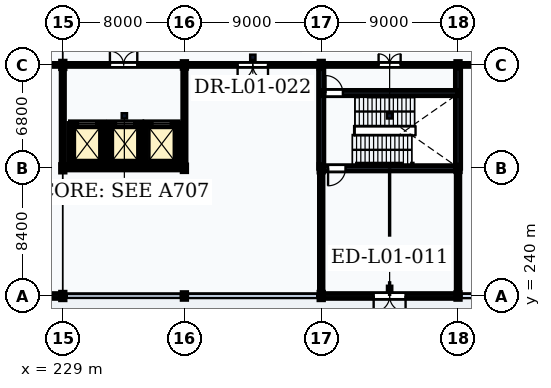
"""IFC4 building model, lengths in metres.
Left out: names, types, materials, properties, quantities, classifications, styles, units other than length and angle.
Written with IfcOpenShell. Run it as: python <this file> out.ifc"""

import sys

from ifc_helpers import new_model, si_unit, direction, frame, frame_2d, origin, origin_2d, place, context, subcontext, project, spatial, rectangle, i_section, extrude, element, fill, save


model = new_model("IFC4")
c1 = context("Model", 3, precision=1e-05, world=origin(), true_north=direction((0.0, 1.0)))
c2 = subcontext(c1, "Body", "Model", "MODEL_VIEW")
j1 = project(units=[si_unit("LENGTHUNIT", "METRE"), si_unit("PLANEANGLEUNIT", "RADIAN")], contexts=[c1])
p1 = place(None, origin())
s1 = spatial("IfcSite", under=j1, at=p1, CompositionType="ELEMENT")
p2 = place(p1, origin())
s2 = spatial("IfcBuilding", under=s1, at=p2, CompositionType="ELEMENT")
p3 = place(p2, origin())
s3 = spatial("IfcBuildingStorey", under=s2, at=p3, CompositionType="ELEMENT", Elevation=0.0)
for number, where, z_axis, x_axis in (
    (1, (229.0, 240.0, 0.0), (0.0, 0.0, 1.0), (1.0, 0.0, 0.0)),
    (2, (229.0, 248.4, 0.0), (0.0, 0.0, 1.0), (1.0, 0.0, 0.0)),
    (3, (229.0, 255.2, 0.0), (0.0, 0.0, 1.0), (1.0, 0.0, 0.0)),
):
    element("IfcColumn", number, at=place(p3, frame(where, z_axis=z_axis, x_axis=x_axis)), inside=s3, PredefinedType="COLUMN", context=c2, shape_type="SweptSolid", body=[
        extrude(i_section(OverallWidth=0.3, OverallDepth=0.5, WebThickness=0.014, FlangeThickness=0.028, FilletRadius=0.027, at=origin_2d()), origin(), (0.0, 0.0, 1.0), 5.4),
    ])
for number, where, z_axis, x_axis in (
    (4, (237.0, 240.0, 0.0), (0.0, 0.0, 1.0), (1.0, 0.0, 0.0)),
    (5, (237.0, 248.4, 0.0), (0.0, 0.0, 1.0), (1.0, 0.0, 0.0)),
    (6, (237.0, 255.2, 0.0), (0.0, 0.0, 1.0), (1.0, 0.0, 0.0)),
):
    element("IfcColumn", number, at=place(p3, frame(where, z_axis=z_axis, x_axis=x_axis)), inside=s3, PredefinedType="COLUMN", context=c2, shape_type="SweptSolid", body=[
        extrude(i_section(OverallWidth=0.3, OverallDepth=0.45, WebThickness=0.014, FlangeThickness=0.026, FilletRadius=0.027, at=origin_2d()), origin(), (0.0, 0.0, 1.0), 5.4),
    ])
for number, where, z_axis, x_axis in (
    (7, (246.0, 240.0, 0.0), (0.0, 0.0, 1.0), (1.0, 0.0, 0.0)),
    (8, (246.0, 248.4, 0.0), (0.0, 0.0, 1.0), (1.0, 0.0, 0.0)),
    (9, (246.0, 255.2, 0.0), (0.0, 0.0, 1.0), (1.0, 0.0, 0.0)),
):
    element("IfcColumn", number, at=place(p3, frame(where, z_axis=z_axis, x_axis=x_axis)), inside=s3, PredefinedType="COLUMN", context=c2, shape_type="SweptSolid", body=[
        extrude(i_section(OverallWidth=0.3, OverallDepth=0.5, WebThickness=0.014, FlangeThickness=0.028, FilletRadius=0.027, at=origin_2d()), origin(), (0.0, 0.0, 1.0), 5.4),
    ])
for number, where, z_axis, x_axis in (
    (10, (255.0, 240.0, 0.0), (0.0, 0.0, 1.0), (1.0, 0.0, 0.0)),
    (11, (255.0, 248.4, 0.0), (0.0, 0.0, 1.0), (1.0, 0.0, 0.0)),
    (12, (255.0, 255.2, 0.0), (0.0, 0.0, 1.0), (1.0, 0.0, 0.0)),
):
    element("IfcColumn", number, at=place(p3, frame(where, z_axis=z_axis, x_axis=x_axis)), inside=s3, PredefinedType="COLUMN", context=c2, shape_type="SweptSolid", body=[
        extrude(i_section(OverallWidth=0.3, OverallDepth=0.45, WebThickness=0.014, FlangeThickness=0.026, FilletRadius=0.027, at=origin_2d()), origin(), (0.0, 0.0, 1.0), 5.4),
    ])
p4 = place(p3, frame((221.006, 240.0, 0.0), z_axis=(0.0, 0.0, 1.0), x_axis=(1.0, 0.0, 0.0)))
e13 = element("IfcWall", 13, at=p4, inside=s3, PredefinedType="SOLIDWALL", context=c2, shape_type="SweptSolid", body=[
    extrude(rectangle(XDim=7.988, YDim=0.32, at=frame_2d((3.994, 0.0))), origin(), (0.0, 0.0, 1.0), 4.838),
])
p5 = place(p4, frame((3.094, 0.0, 0.95)))
e14 = element("IfcOpeningElement", 14, at=p5, cuts=e13, PredefinedType="OPENING", context=c2, shape_type="SweptSolid", body=[
    extrude(rectangle(XDim=1.8, YDim=2.6, at=frame_2d((0.9, 1.3))), frame((0.0, 0.175, 0.0), z_axis=(0.0, -1.0, 0.0), x_axis=(1.0, 0.0, 0.0)), (0.0, 0.0, 1.0), 0.35),
])
p6 = place(p3, frame((246.006, 240.0, 0.0), z_axis=(0.0, 0.0, 1.0), x_axis=(1.0, 0.0, 0.0)))
e15 = element("IfcWall", 15, at=p6, inside=s3, PredefinedType="SOLIDWALL", context=c2, shape_type="SweptSolid", body=[
    extrude(rectangle(XDim=8.988, YDim=0.32, at=frame_2d((4.494, 0.0))), origin(), (0.0, 0.0, 1.0), 4.798),
])
p7 = place(p6, frame((3.444, 0.0, 0.0)))
e16 = element("IfcOpeningElement", 16, at=p7, cuts=e15, PredefinedType="OPENING", context=c2, shape_type="SweptSolid", body=[
    extrude(rectangle(XDim=2.1, YDim=2.7, at=frame_2d((1.05, 1.35))), frame((0.0, 0.175, 0.0), z_axis=(0.0, -1.0, 0.0), x_axis=(1.0, 0.0, 0.0)), (0.0, 0.0, 1.0), 0.35),
])
p8 = place(p3, frame((120.1, 240.1, 5.4), z_axis=(0.0, 0.0, 1.0), x_axis=(1.0, 0.0, 0.0)))
e17 = element("IfcWall", 17, at=p8, inside=s3, PredefinedType="PARAPET", context=c2, shape_type="SweptSolid", body=[
    extrude(rectangle(XDim=167.8, YDim=0.18, at=frame_2d((83.9, 0.0))), origin(), (0.0, 0.0, 1.0), 1.2),
])
p9 = place(p3, frame((246.0, 248.4, 0.0), z_axis=(0.0, 0.0, 1.0), x_axis=(1.0, 0.0, 0.0)))
e18 = element("IfcWall", 18, at=p9, inside=s3, PredefinedType="SHEAR", context=c2, shape_type="SweptSolid", body=[
    extrude(rectangle(XDim=9.0, YDim=0.35, at=frame_2d((4.5, 0.0))), origin(), (0.0, 0.0, 1.0), 5.14),
])
p10 = place(p9, frame((0.45, 0.0, 0.0)))
e19 = element("IfcOpeningElement", 19, at=p10, cuts=e18, PredefinedType="OPENING", context=c2, shape_type="SweptSolid", body=[
    extrude(rectangle(XDim=1.15, YDim=2.15, at=frame_2d((0.575, 1.075))), frame((0.0, 0.19, 0.0), z_axis=(0.0, -1.0, 0.0), x_axis=(1.0, 0.0, 0.0)), (0.0, 0.0, 1.0), 0.38),
])
for number, where, z_axis, x_axis in (
    (20, (246.0, 248.4, 0.0), (0.0, 0.0, 1.0), (0.0, 1.0, 0.0)),
    (21, (255.0, 248.4, 0.0), (0.0, 0.0, 1.0), (0.0, 1.0, 0.0)),
):
    element("IfcWall", number, at=place(p3, frame(where, z_axis=z_axis, x_axis=x_axis)), inside=s3, PredefinedType="SHEAR", context=c2, shape_type="SweptSolid", body=[
        extrude(rectangle(XDim=6.8, YDim=0.35, at=frame_2d((3.4, 0.0))), origin(), (0.0, 0.0, 1.0), 5.14),
    ])
p11 = place(p3, frame((246.0, 253.35, 0.0), z_axis=(0.0, 0.0, 1.0), x_axis=(1.0, 0.0, 0.0)))
e22 = element("IfcWall", 22, at=p11, inside=s3, PredefinedType="SHEAR", context=c2, shape_type="SweptSolid", body=[
    extrude(rectangle(XDim=9.0, YDim=0.35, at=frame_2d((4.5, 0.0))), origin(), (0.0, 0.0, 1.0), 5.14),
])
p12 = place(p11, frame((0.275, 0.0, 0.0)))
e23 = element("IfcOpeningElement", 23, at=p12, cuts=e22, PredefinedType="OPENING", context=c2, shape_type="SweptSolid", body=[
    extrude(rectangle(XDim=1.15, YDim=2.15, at=frame_2d((0.575, 1.075))), frame((0.0, 0.19, 0.0), z_axis=(0.0, -1.0, 0.0), x_axis=(1.0, 0.0, 0.0)), (0.0, 0.0, 1.0), 0.38),
])
p13 = place(p3, frame((246.0, 255.2, 0.0), z_axis=(0.0, 0.0, 1.0), x_axis=(1.0, 0.0, 0.0)))
e24 = element("IfcWall", 24, at=p13, inside=s3, PredefinedType="PARTITIONING", context=c2, shape_type="SweptSolid", body=[
    extrude(rectangle(XDim=9.0, YDim=0.2, at=frame_2d((4.5, 0.0))), origin(), (0.0, 0.0, 1.0), 4.588),
])
p14 = place(p13, frame((3.775, 0.0, 0.0)))
e25 = element("IfcOpeningElement", 25, at=p14, cuts=e24, PredefinedType="OPENING", context=c2, shape_type="SweptSolid", body=[
    extrude(rectangle(XDim=1.45, YDim=2.2, at=frame_2d((0.725, 1.1))), frame((0.0, 0.115, 0.0), z_axis=(0.0, -1.0, 0.0), x_axis=(1.0, 0.0, 0.0)), (0.0, 0.0, 1.0), 0.23),
])
p15 = place(p3, frame((229.5, 248.65, 0.0), z_axis=(0.0, 0.0, 1.0), x_axis=(1.0, 0.0, 0.0)))
e26 = element("IfcWall", 26, at=p15, inside=s3, PredefinedType="SHEAR", context=c2, shape_type="SweptSolid", body=[
    extrude(rectangle(XDim=2.2, YDim=0.22, at=frame_2d((1.1, 0.0))), origin(), (0.0, 0.0, 1.0), 5.14),
])
for number, where, z_axis, x_axis in (
    (27, (229.5, 248.65, 0.0), (0.0, 0.0, 1.0), (0.0, 1.0, 0.0)),
    (28, (231.7, 248.65, 0.0), (0.0, 0.0, 1.0), (0.0, 1.0, 0.0)),
):
    element("IfcWall", number, at=place(p3, frame(where, z_axis=z_axis, x_axis=x_axis)), inside=s3, PredefinedType="SHEAR", context=c2, shape_type="SweptSolid", body=[
        extrude(rectangle(XDim=2.7, YDim=0.22, at=frame_2d((1.35, 0.0))), origin(), (0.0, 0.0, 1.0), 5.14),
    ])
p16 = place(p3, frame((229.5, 251.35, 0.0), z_axis=(0.0, 0.0, 1.0), x_axis=(1.0, 0.0, 0.0)))
e29 = element("IfcWall", 29, at=p16, inside=s3, PredefinedType="SHEAR", context=c2, shape_type="SweptSolid", body=[
    extrude(rectangle(XDim=2.2, YDim=0.22, at=frame_2d((1.1, 0.0))), origin(), (0.0, 0.0, 1.0), 5.14),
])
p17 = place(p16, frame((0.5, 0.0, 0.0)))
e30 = element("IfcOpeningElement", 30, at=p17, cuts=e29, PredefinedType="OPENING", context=c2, shape_type="SweptSolid", body=[
    extrude(rectangle(XDim=1.2, YDim=2.2, at=frame_2d((0.6, 1.1))), frame((0.0, 0.125, 0.0), z_axis=(0.0, -1.0, 0.0), x_axis=(1.0, 0.0, 0.0)), (0.0, 0.0, 1.0), 0.25),
])
p18 = place(p3, frame((232.0, 248.65, 0.0), z_axis=(0.0, 0.0, 1.0), x_axis=(1.0, 0.0, 0.0)))
e31 = element("IfcWall", 31, at=p18, inside=s3, PredefinedType="SHEAR", context=c2, shape_type="SweptSolid", body=[
    extrude(rectangle(XDim=2.2, YDim=0.22, at=frame_2d((1.1, 0.0))), origin(), (0.0, 0.0, 1.0), 5.14),
])
for number, where, z_axis, x_axis in (
    (32, (232.0, 248.65, 0.0), (0.0, 0.0, 1.0), (0.0, 1.0, 0.0)),
    (33, (234.2, 248.65, 0.0), (0.0, 0.0, 1.0), (0.0, 1.0, 0.0)),
):
    element("IfcWall", number, at=place(p3, frame(where, z_axis=z_axis, x_axis=x_axis)), inside=s3, PredefinedType="SHEAR", context=c2, shape_type="SweptSolid", body=[
        extrude(rectangle(XDim=2.7, YDim=0.22, at=frame_2d((1.35, 0.0))), origin(), (0.0, 0.0, 1.0), 5.14),
    ])
p19 = place(p3, frame((232.0, 251.35, 0.0), z_axis=(0.0, 0.0, 1.0), x_axis=(1.0, 0.0, 0.0)))
e34 = element("IfcWall", 34, at=p19, inside=s3, PredefinedType="SHEAR", context=c2, shape_type="SweptSolid", body=[
    extrude(rectangle(XDim=2.2, YDim=0.22, at=frame_2d((1.1, 0.0))), origin(), (0.0, 0.0, 1.0), 5.14),
])
p20 = place(p19, frame((0.5, 0.0, 0.0)))
e35 = element("IfcOpeningElement", 35, at=p20, cuts=e34, PredefinedType="OPENING", context=c2, shape_type="SweptSolid", body=[
    extrude(rectangle(XDim=1.2, YDim=2.2, at=frame_2d((0.6, 1.1))), frame((0.0, 0.125, 0.0), z_axis=(0.0, -1.0, 0.0), x_axis=(1.0, 0.0, 0.0)), (0.0, 0.0, 1.0), 0.25),
])
p21 = place(p3, frame((234.4, 248.65, 0.0), z_axis=(0.0, 0.0, 1.0), x_axis=(1.0, 0.0, 0.0)))
e36 = element("IfcWall", 36, at=p21, inside=s3, PredefinedType="SHEAR", context=c2, shape_type="SweptSolid", body=[
    extrude(rectangle(XDim=2.2, YDim=0.22, at=frame_2d((1.1, 0.0))), origin(), (0.0, 0.0, 1.0), 5.14),
])
for number, where, z_axis, x_axis in (
    (37, (234.4, 248.65, 0.0), (0.0, 0.0, 1.0), (0.0, 1.0, 0.0)),
    (38, (236.6, 248.65, 0.0), (0.0, 0.0, 1.0), (0.0, 1.0, 0.0)),
):
    element("IfcWall", number, at=place(p3, frame(where, z_axis=z_axis, x_axis=x_axis)), inside=s3, PredefinedType="SHEAR", context=c2, shape_type="SweptSolid", body=[
        extrude(rectangle(XDim=2.7, YDim=0.22, at=frame_2d((1.35, 0.0))), origin(), (0.0, 0.0, 1.0), 5.14),
    ])
p22 = place(p3, frame((234.4, 251.35, 0.0), z_axis=(0.0, 0.0, 1.0), x_axis=(1.0, 0.0, 0.0)))
e39 = element("IfcWall", 39, at=p22, inside=s3, PredefinedType="SHEAR", context=c2, shape_type="SweptSolid", body=[
    extrude(rectangle(XDim=2.2, YDim=0.22, at=frame_2d((1.1, 0.0))), origin(), (0.0, 0.0, 1.0), 5.14),
])
p23 = place(p22, frame((0.5, 0.0, 0.0)))
e40 = element("IfcOpeningElement", 40, at=p23, cuts=e39, PredefinedType="OPENING", context=c2, shape_type="SweptSolid", body=[
    extrude(rectangle(XDim=1.2, YDim=2.2, at=frame_2d((0.6, 1.1))), frame((0.0, 0.125, 0.0), z_axis=(0.0, -1.0, 0.0), x_axis=(1.0, 0.0, 0.0)), (0.0, 0.0, 1.0), 0.25),
])
for number, where, z_axis, x_axis in (
    (41, (229.0, 248.4, 0.0), (0.0, 0.0, 1.0), (0.0, 1.0, 0.0)),
    (42, (237.0, 248.4, 0.0), (0.0, 0.0, 1.0), (0.0, 1.0, 0.0)),
):
    element("IfcWall", number, at=place(p3, frame(where, z_axis=z_axis, x_axis=x_axis)), inside=s3, PredefinedType="PARTITIONING", context=c2, shape_type="SweptSolid", body=[
        extrude(rectangle(XDim=6.8, YDim=0.22, at=frame_2d((3.4, 0.0))), origin(), (0.0, 0.0, 1.0), 4.778),
    ])
p24 = place(p3, frame((229.0, 248.4, 0.0), z_axis=(0.0, 0.0, 1.0), x_axis=(1.0, 0.0, 0.0)))
e43 = element("IfcWall", 43, at=p24, inside=s3, PredefinedType="PARTITIONING", context=c2, shape_type="SweptSolid", body=[
    extrude(rectangle(XDim=8.0, YDim=0.22, at=frame_2d((4.0, 0.0))), origin(), (0.0, 0.0, 1.0), 4.688),
])
p25 = place(p3, frame((229.0, 255.2, 0.0), z_axis=(0.0, 0.0, 1.0), x_axis=(1.0, 0.0, 0.0)))
e44 = element("IfcWall", 44, at=p25, inside=s3, PredefinedType="PARTITIONING", context=c2, shape_type="SweptSolid", body=[
    extrude(rectangle(XDim=8.0, YDim=0.2, at=frame_2d((4.0, 0.0))), origin(), (0.0, 0.0, 1.0), 4.688),
])
p26 = place(p25, frame((3.1, 0.0, 0.0)))
e45 = element("IfcOpeningElement", 45, at=p26, cuts=e44, PredefinedType="OPENING", context=c2, shape_type="SweptSolid", body=[
    extrude(rectangle(XDim=1.8, YDim=2.4, at=frame_2d((0.9, 1.2))), frame((0.0, 0.115, 0.0), z_axis=(0.0, -1.0, 0.0), x_axis=(1.0, 0.0, 0.0)), (0.0, 0.0, 1.0), 0.23),
])
p27 = place(p3, frame((205.0, 255.2, 0.0), z_axis=(0.0, 0.0, 1.0), x_axis=(1.0, 0.0, 0.0)))
e46 = element("IfcWall", 46, at=p27, inside=s3, PredefinedType="PARTITIONING", context=c2, shape_type="SweptSolid", body=[
    extrude(rectangle(XDim=24.0, YDim=0.2, at=frame_2d((12.0, 0.0))), origin(), (0.0, 0.0, 1.0), 4.638),
])
p28 = place(p27, frame((5.1, 0.0, 0.0)))
e47 = element("IfcOpeningElement", 47, at=p28, cuts=e46, PredefinedType="OPENING", context=c2, shape_type="SweptSolid", body=[
    extrude(rectangle(XDim=1.8, YDim=2.4, at=frame_2d((0.9, 1.2))), frame((0.0, 0.115, 0.0), z_axis=(0.0, -1.0, 0.0), x_axis=(1.0, 0.0, 0.0)), (0.0, 0.0, 1.0), 0.23),
])
p29 = place(p27, frame((17.2, 0.0, 0.0)))
e48 = element("IfcOpeningElement", 48, at=p29, cuts=e46, PredefinedType="OPENING", context=c2, shape_type="SweptSolid", body=[
    extrude(rectangle(XDim=1.6, YDim=2.25, at=frame_2d((0.8, 1.125))), frame((0.0, 0.115, 0.0), z_axis=(0.0, -1.0, 0.0), x_axis=(1.0, 0.0, 0.0)), (0.0, 0.0, 1.0), 0.23),
])
for number, where, z_axis, x_axis in (
    (49, (246.0, 240.0, 0.0), (0.0, 0.0, 1.0), (0.0, 1.0, 0.0)),
    (50, (255.0, 240.0, 0.0), (0.0, 0.0, 1.0), (0.0, 1.0, 0.0)),
):
    element("IfcWall", number, at=place(p3, frame(where, z_axis=z_axis, x_axis=x_axis)), inside=s3, PredefinedType="PARTITIONING", context=c2, shape_type="SweptSolid", body=[
        extrude(rectangle(XDim=8.4, YDim=0.24, at=frame_2d((4.2, 0.0))), origin(), (0.0, 0.0, 1.0), 4.688),
    ])
p30 = place(p3, frame((237.0, 255.2, 0.0), z_axis=(0.0, 0.0, 1.0), x_axis=(1.0, 0.0, 0.0)))
e51 = element("IfcWall", 51, at=p30, inside=s3, PredefinedType="PARTITIONING", context=c2, shape_type="SweptSolid", body=[
    extrude(rectangle(XDim=9.0, YDim=0.2, at=frame_2d((4.5, 0.0))), origin(), (0.0, 0.0, 1.0), 4.588),
])
p31 = place(p30, frame((3.5, 0.0, 0.0)))
e52 = element("IfcOpeningElement", 52, at=p31, cuts=e51, PredefinedType="OPENING", context=c2, shape_type="SweptSolid", body=[
    extrude(rectangle(XDim=2.0, YDim=2.4, at=frame_2d((1.0, 1.2))), frame((0.0, 0.115, 0.0), z_axis=(0.0, -1.0, 0.0), x_axis=(1.0, 0.0, 0.0)), (0.0, 0.0, 1.0), 0.23),
])
p32 = place(p3, frame((255.0, 255.2, 0.0), z_axis=(0.0, 0.0, 1.0), x_axis=(1.0, 0.0, 0.0)))
e53 = element("IfcWall", 53, at=p32, inside=s3, PredefinedType="PARTITIONING", context=c2, shape_type="SweptSolid", body=[
    extrude(rectangle(XDim=18.0, YDim=0.2, at=frame_2d((9.0, 0.0))), origin(), (0.0, 0.0, 1.0), 4.588),
])
p33 = place(p32, frame((6.46, 0.0, 0.0)))
e54 = element("IfcOpeningElement", 54, at=p33, cuts=e53, PredefinedType="OPENING", context=c2, shape_type="SweptSolid", body=[
    extrude(rectangle(XDim=2.0, YDim=2.4, at=frame_2d((1.0, 1.2))), frame((0.0, 0.115, 0.0), z_axis=(0.0, -1.0, 0.0), x_axis=(1.0, 0.0, 0.0)), (0.0, 0.0, 1.0), 0.23),
])
p34 = place(p7, frame((2.1, 0.0, 0.0), z_axis=(0.0, 0.0, 1.0), x_axis=(-1.0, 0.0, 0.0)))
e55 = element("IfcDoor", 55, at=p34, inside=s3, OperationType="DOUBLE_DOOR_SINGLE_SWING", PredefinedType="DOOR", context=c2, shape_type="SweptSolid", body=[
    extrude(rectangle(XDim=2.1, YDim=2.7, at=frame_2d((1.05, 1.35))), frame((0.0, 0.025, 0.0), z_axis=(0.0, -1.0, 0.0), x_axis=(1.0, 0.0, 0.0)), (0.0, 0.0, 1.0), 0.05),
])
fill(e16, e55)
p35 = place(p12, origin())
e56 = element("IfcDoor", 56, at=p35, inside=s3, OperationType="SINGLE_SWING_LEFT", PredefinedType="DOOR", context=c2, shape_type="SweptSolid", body=[
    extrude(rectangle(XDim=1.15, YDim=2.15, at=frame_2d((0.575, 1.075))), frame((0.0, 0.025, 0.0), z_axis=(0.0, -1.0, 0.0), x_axis=(1.0, 0.0, 0.0)), (0.0, 0.0, 1.0), 0.05),
])
fill(e23, e56)
p36 = place(p10, frame((1.15, 0.0, 0.0), z_axis=(0.0, 0.0, 1.0), x_axis=(-1.0, 0.0, 0.0)))
e57 = element("IfcDoor", 57, at=p36, inside=s3, OperationType="SINGLE_SWING_RIGHT", PredefinedType="DOOR", context=c2, shape_type="SweptSolid", body=[
    extrude(rectangle(XDim=1.15, YDim=2.15, at=frame_2d((0.575, 1.075))), frame((0.0, 0.025, 0.0), z_axis=(0.0, -1.0, 0.0), x_axis=(1.0, 0.0, 0.0)), (0.0, 0.0, 1.0), 0.05),
])
fill(e19, e57)
p37 = place(p14, origin())
e58 = element("IfcDoor", 58, at=p37, inside=s3, OperationType="DOUBLE_DOOR_SINGLE_SWING", PredefinedType="DOOR", context=c2, shape_type="SweptSolid", body=[
    extrude(rectangle(XDim=1.45, YDim=2.2, at=frame_2d((0.725, 1.1))), frame((0.0, 0.025, 0.0), z_axis=(0.0, -1.0, 0.0), x_axis=(1.0, 0.0, 0.0)), (0.0, 0.0, 1.0), 0.05),
])
fill(e25, e58)
p38 = place(p17, origin())
e59 = element("IfcDoor", 59, at=p38, inside=s3, OperationType="DOUBLE_DOOR_SLIDING", PredefinedType="USERDEFINED", context=c2, shape_type="SweptSolid", body=[
    extrude(rectangle(XDim=1.2, YDim=2.2, at=frame_2d((0.6, 1.1))), frame((0.0, 0.025, 0.0), z_axis=(0.0, -1.0, 0.0), x_axis=(1.0, 0.0, 0.0)), (0.0, 0.0, 1.0), 0.05),
])
fill(e30, e59)
p39 = place(p20, origin())
e60 = element("IfcDoor", 60, at=p39, inside=s3, OperationType="DOUBLE_DOOR_SLIDING", PredefinedType="USERDEFINED", context=c2, shape_type="SweptSolid", body=[
    extrude(rectangle(XDim=1.2, YDim=2.2, at=frame_2d((0.6, 1.1))), frame((0.0, 0.025, 0.0), z_axis=(0.0, -1.0, 0.0), x_axis=(1.0, 0.0, 0.0)), (0.0, 0.0, 1.0), 0.05),
])
fill(e35, e60)
p40 = place(p23, origin())
e61 = element("IfcDoor", 61, at=p40, inside=s3, OperationType="DOUBLE_DOOR_SLIDING", PredefinedType="USERDEFINED", context=c2, shape_type="SweptSolid", body=[
    extrude(rectangle(XDim=1.2, YDim=2.2, at=frame_2d((0.6, 1.1))), frame((0.0, 0.025, 0.0), z_axis=(0.0, -1.0, 0.0), x_axis=(1.0, 0.0, 0.0)), (0.0, 0.0, 1.0), 0.05),
])
fill(e40, e61)
p41 = place(p26, origin())
e62 = element("IfcDoor", 62, at=p41, inside=s3, OperationType="DOUBLE_DOOR_SINGLE_SWING", PredefinedType="DOOR", context=c2, shape_type="SweptSolid", body=[
    extrude(rectangle(XDim=1.8, YDim=2.4, at=frame_2d((0.9, 1.2))), frame((0.0, 0.025, 0.0), z_axis=(0.0, -1.0, 0.0), x_axis=(1.0, 0.0, 0.0)), (0.0, 0.0, 1.0), 0.05),
])
fill(e45, e62)
p42 = place(p31, frame((2.0, 0.0, 0.0), z_axis=(0.0, 0.0, 1.0), x_axis=(-1.0, 0.0, 0.0)))
e63 = element("IfcDoor", 63, at=p42, inside=s3, OperationType="DOUBLE_DOOR_SINGLE_SWING", PredefinedType="DOOR", context=c2, shape_type="SweptSolid", body=[
    extrude(rectangle(XDim=2.0, YDim=2.4, at=frame_2d((1.0, 1.2))), frame((0.0, 0.025, 0.0), z_axis=(0.0, -1.0, 0.0), x_axis=(1.0, 0.0, 0.0)), (0.0, 0.0, 1.0), 0.05),
])
fill(e52, e63)
save(model, sys.argv[1])
